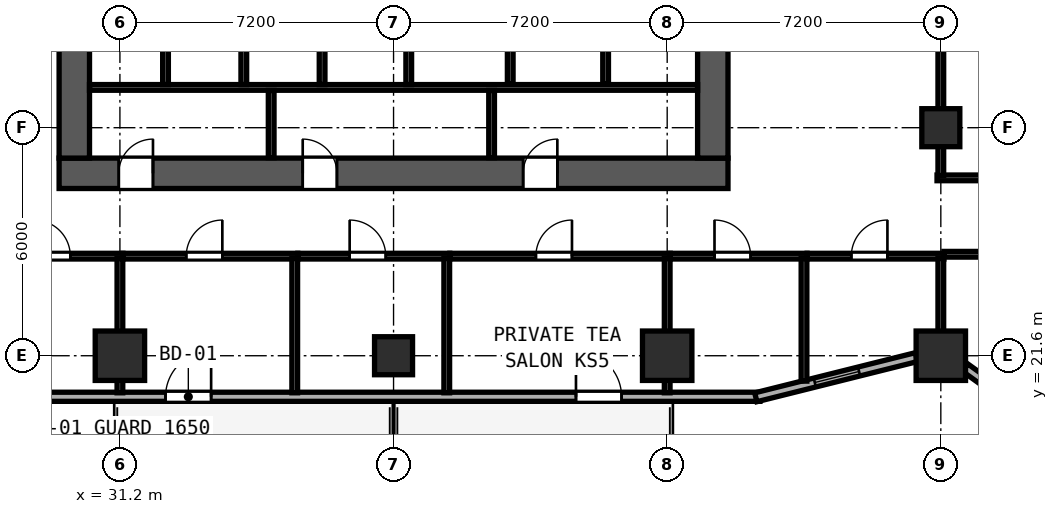
"""IFC4 building model, lengths in metres.
Left out: names, types, materials, properties, quantities, classifications, styles, units other than length and angle.
Written with IfcOpenShell. Run it as: python <this file> out.ifc"""

import sys

from ifc_helpers import new_model, si_unit, direction, frame, frame_2d, origin, origin_2d, place, context, subcontext, project, spatial, rectangle, hollow_rectangle, extrude, element, fill, save


model = new_model("IFC4")
c1 = context("Model", 3, precision=1e-05, world=origin(), true_north=direction((0.0, 1.0)))
c2 = subcontext(c1, "Body", "Model", "MODEL_VIEW")
j1 = project(units=[si_unit("LENGTHUNIT", "METRE"), si_unit("PLANEANGLEUNIT", "RADIAN")], contexts=[c1])
p1 = place(None, origin())
s1 = spatial("IfcSite", under=j1, at=p1, CompositionType="ELEMENT")
p2 = place(p1, origin())
s2 = spatial("IfcBuilding", under=s1, at=p2, CompositionType="ELEMENT")
p3 = place(p2, frame((0.0, 0.0, 39.2)))
s3 = spatial("IfcBuildingStorey", under=s2, at=p3, CompositionType="ELEMENT", Elevation=39.2)
p4 = place(p3, frame((29.6, 26.4, 0.0), z_axis=(0.0, 0.0, 1.0), x_axis=(1.0, 0.0, 0.0)))
e1 = element("IfcWall", 1, at=p4, inside=s3, PredefinedType="SHEAR", context=c2, shape_type="SweptSolid", body=[
    extrude(rectangle(XDim=17.6, YDim=0.8, at=frame_2d((8.8, 0.0))), origin(), (0.0, 0.0, 1.0), 3.54),
])
p5 = place(p4, frame((2.47, 0.0, 0.0), z_axis=(0.0, 0.0, 1.0), x_axis=(-1.0, 0.0, 0.0)))
e2 = element("IfcOpeningElement", 2, at=p5, cuts=e1, PredefinedType="OPENING", context=c2, shape_type="SweptSolid", body=[
    extrude(rectangle(XDim=0.9, YDim=2.1, at=frame_2d((0.45, 1.05))), frame((0.0, 0.41, 0.0), z_axis=(0.0, -1.0, 0.0), x_axis=(1.0, 0.0, 0.0)), (0.0, 0.0, 1.0), 0.82),
])
p6 = place(p4, frame((7.31, 0.0, 0.0), z_axis=(0.0, 0.0, 1.0), x_axis=(-1.0, 0.0, 0.0)))
e3 = element("IfcOpeningElement", 3, at=p6, cuts=e1, PredefinedType="OPENING", context=c2, shape_type="SweptSolid", body=[
    extrude(rectangle(XDim=0.9, YDim=2.1, at=frame_2d((0.45, 1.05))), frame((0.0, 0.41, 0.0), z_axis=(0.0, -1.0, 0.0), x_axis=(1.0, 0.0, 0.0)), (0.0, 0.0, 1.0), 0.82),
])
p7 = place(p4, frame((13.11, 0.0, 0.0), z_axis=(0.0, 0.0, 1.0), x_axis=(-1.0, 0.0, 0.0)))
e4 = element("IfcOpeningElement", 4, at=p7, cuts=e1, PredefinedType="OPENING", context=c2, shape_type="SweptSolid", body=[
    extrude(rectangle(XDim=0.9, YDim=2.1, at=frame_2d((0.45, 1.05))), frame((0.0, 0.41, 0.0), z_axis=(0.0, -1.0, 0.0), x_axis=(1.0, 0.0, 0.0)), (0.0, 0.0, 1.0), 0.82),
])
for number, where, z_axis, x_axis in (
    (5, (30.0, 26.8, 0.0), (0.0, 0.0, 1.0), (0.0, 1.0, 0.0)),
    (6, (46.8, 26.8, 0.0), (0.0, 0.0, 1.0), (0.0, 1.0, 0.0)),
):
    element("IfcWall", number, at=place(p3, frame(where, z_axis=z_axis, x_axis=x_axis)), inside=s3, PredefinedType="SHEAR", context=c2, shape_type="SweptSolid", body=[
        extrude(rectangle(XDim=4.05, YDim=0.8, at=frame_2d((2.025, 0.0))), origin(), (0.0, 0.0, 1.0), 3.54),
    ])
for number, where, z_axis, x_axis in (
    (7, (52.8, 21.6, 0.0), (0.0, 0.0, 1.0), (1.0, 0.0, 0.0)),
    (8, (31.2, 21.6, 0.0), (0.0, 0.0, 1.0), (1.0, 0.0, 0.0)),
    (9, (45.6, 21.6, 0.0), (0.0, 0.0, 1.0), (1.0, 0.0, 0.0)),
):
    element("IfcColumn", number, at=place(p3, frame(where, z_axis=z_axis, x_axis=x_axis)), inside=s3, PredefinedType="COLUMN", context=c2, shape_type="SweptSolid", body=[
        extrude(hollow_rectangle(XDim=1.3, YDim=1.3, WallThickness=0.048, at=origin_2d()), origin(), (0.0, 0.0, 1.0), 3.8),
    ])
for number, where, z_axis, x_axis in (
    (10, (52.8, 27.6, 0.0), (0.0, 0.0, 1.0), (1.0, 0.0, 0.0)),
    (11, (38.4, 21.6, 0.0), (0.0, 0.0, 1.0), (1.0, 0.0, 0.0)),
):
    element("IfcColumn", number, at=place(p3, frame(where, z_axis=z_axis, x_axis=x_axis)), inside=s3, PredefinedType="COLUMN", context=c2, shape_type="SweptSolid", body=[
        extrude(hollow_rectangle(XDim=1.0, YDim=1.0, WallThickness=0.038, at=origin_2d()), origin(), (0.0, 0.0, 1.0), 3.8),
    ])
p8 = place(p3, frame((28.76, 20.52, 0.0), z_axis=(0.0, 0.0, 1.0), x_axis=(1.0, 0.0, 0.0)))
e12 = element("IfcWall", 12, at=p8, inside=s3, PredefinedType="SOLIDWALL", context=c2, shape_type="SweptSolid", body=[
    extrude(rectangle(XDim=19.281, YDim=0.24, at=frame_2d((9.64, 0.0))), origin(), (0.0, 0.0, 1.0), 3.54),
])
p9 = place(p8, frame((4.84, 0.0, 0.0), z_axis=(0.0, 0.0, 1.0), x_axis=(-1.0, 0.0, 0.0)))
e13 = element("IfcOpeningElement", 13, at=p9, cuts=e12, PredefinedType="OPENING", context=c2, shape_type="SweptSolid", body=[
    extrude(rectangle(XDim=1.2, YDim=2.15, at=frame_2d((0.6, 1.075))), frame((0.0, 0.13, 0.0), z_axis=(0.0, -1.0, 0.0), x_axis=(1.0, 0.0, 0.0)), (0.0, 0.0, 1.0), 0.26),
])
p10 = place(p8, frame((15.64, 0.0, 0.0), z_axis=(0.0, 0.0, 1.0), x_axis=(-1.0, 0.0, 0.0)))
e14 = element("IfcOpeningElement", 14, at=p10, cuts=e12, PredefinedType="OPENING", context=c2, shape_type="SweptSolid", body=[
    extrude(rectangle(XDim=1.2, YDim=2.15, at=frame_2d((0.6, 1.075))), frame((0.0, 0.13, 0.0), z_axis=(0.0, -1.0, 0.0), x_axis=(1.0, 0.0, 0.0)), (0.0, 0.0, 1.0), 0.26),
])
p11 = place(p3, frame((47.932, 20.507, 0.0), z_axis=(0.0, 0.0, 1.0), x_axis=(0.970135906278, 0.242561998982, 0.0)))
e15 = element("IfcWall", 15, at=p11, inside=s3, PredefinedType="SOLIDWALL", context=c2, shape_type="SweptSolid", body=[
    extrude(rectangle(XDim=4.356, YDim=0.24, at=frame_2d((2.178, 0.0))), origin(), (0.0, 0.0, 1.0), 3.037),
])
p12 = place(p11, frame((1.6, 0.0, 0.85)))
e16 = element("IfcOpeningElement", 16, at=p12, cuts=e15, PredefinedType="OPENING", context=c2, shape_type="SweptSolid", body=[
    extrude(rectangle(XDim=1.2, YDim=1.85, at=frame_2d((0.6, 0.925))), frame((0.0, 0.13, 0.0), z_axis=(0.0, -1.0, 0.0), x_axis=(1.0, 0.0, 0.0)), (0.0, 0.0, 1.0), 0.26),
])
p13 = place(p3, frame((53.442, 21.286, 0.0), z_axis=(0.0, 0.0, 1.0), x_axis=(0.811542842993, -0.584292917967, 0.0)))
e17 = element("IfcWall", 17, at=p13, inside=s3, PredefinedType="SOLIDWALL", context=c2, shape_type="SweptSolid", body=[
    extrude(rectangle(XDim=11.438, YDim=0.24, at=frame_2d((5.719, 0.0))), origin(), (0.0, 0.0, 1.0), 3.037),
])
p14 = place(p13, frame((1.6, 0.0, 0.85)))
e18 = element("IfcOpeningElement", 18, at=p14, cuts=e17, PredefinedType="OPENING", context=c2, shape_type="SweptSolid", body=[
    extrude(rectangle(XDim=1.2, YDim=1.85, at=frame_2d((0.6, 0.925))), frame((0.0, 0.13, 0.0), z_axis=(0.0, -1.0, 0.0), x_axis=(1.0, 0.0, 0.0)), (0.0, 0.0, 1.0), 0.26),
])
p15 = place(p13, frame((7.0, 0.0, 0.85)))
e19 = element("IfcOpeningElement", 19, at=p15, cuts=e17, PredefinedType="OPENING", context=c2, shape_type="SweptSolid", body=[
    extrude(rectangle(XDim=1.2, YDim=1.85, at=frame_2d((0.6, 0.925))), frame((0.0, 0.13, 0.0), z_axis=(0.0, -1.0, 0.0), x_axis=(1.0, 0.0, 0.0)), (0.0, 0.0, 1.0), 0.26),
])
p16 = place(p13, frame((9.669, 0.0, 0.85)))
e20 = element("IfcOpeningElement", 20, at=p16, cuts=e17, PredefinedType="OPENING", context=c2, shape_type="SweptSolid", body=[
    extrude(rectangle(XDim=1.2, YDim=1.85, at=frame_2d((0.6, 0.925))), frame((0.0, 0.13, 0.0), z_axis=(0.0, -1.0, 0.0), x_axis=(1.0, 0.0, 0.0)), (0.0, 0.0, 1.0), 0.26),
])
p17 = place(p3, frame((30.4, 28.66, 0.0), z_axis=(0.0, 0.0, 1.0), x_axis=(1.0, 0.0, 0.0)))
e21 = element("IfcWall", 21, at=p17, inside=s3, PredefinedType="PARTITIONING", context=c2, shape_type="SweptSolid", body=[
    extrude(rectangle(XDim=16.0, YDim=0.15, at=frame_2d((8.0, 0.0))), origin(), (0.0, 0.0, 1.0), 3.54),
])
for number, where, z_axis, x_axis in (
    (22, (32.4, 28.735, 0.0), (0.0, 0.0, 1.0), (0.0, 1.0, 0.0)),
    (23, (34.46, 28.735, 0.0), (0.0, 0.0, 1.0), (0.0, 1.0, 0.0)),
    (24, (36.52, 28.735, 0.0), (0.0, 0.0, 1.0), (0.0, 1.0, 0.0)),
    (25, (38.8, 28.735, 0.0), (0.0, 0.0, 1.0), (0.0, 1.0, 0.0)),
):
    element("IfcWall", number, at=place(p3, frame(where, z_axis=z_axis, x_axis=x_axis)), inside=s3, PredefinedType="SOLIDWALL", context=c2, shape_type="SweptSolid", body=[
        extrude(rectangle(XDim=1.985, YDim=0.15, at=frame_2d((0.992, 0.0))), origin(), (0.0, 0.0, 1.0), 3.54),
    ])
for number, where, z_axis, x_axis in (
    (26, (35.18, 26.81, 0.0), (0.0, 0.0, 1.0), (0.0, 1.0, 0.0)),
    (27, (40.98, 26.81, 0.0), (0.0, 0.0, 1.0), (0.0, 1.0, 0.0)),
):
    element("IfcWall", number, at=place(p3, frame(where, z_axis=z_axis, x_axis=x_axis)), inside=s3, PredefinedType="PARTITIONING", context=c2, shape_type="SweptSolid", body=[
        extrude(rectangle(XDim=1.77, YDim=0.15, at=frame_2d((0.885, 0.0))), origin(), (0.0, 0.0, 1.0), 3.54),
    ])
for number, where, z_axis, x_axis in (
    (28, (41.47, 28.75, 0.0), (0.0, 0.0, 1.0), (0.0, 1.0, 0.0)),
    (29, (43.98, 28.75, 0.0), (0.0, 0.0, 1.0), (0.0, 1.0, 0.0)),
):
    element("IfcWall", number, at=place(p3, frame(where, z_axis=z_axis, x_axis=x_axis)), inside=s3, PredefinedType="SOLIDWALL", context=c2, shape_type="SweptSolid", body=[
        extrude(rectangle(XDim=1.985, YDim=0.15, at=frame_2d((0.993, 0.0))), origin(), (0.0, 0.0, 1.0), 3.54),
    ])
p18 = place(p3, frame((27.882, 24.22, 0.0), z_axis=(0.0, 0.0, 1.0), x_axis=(1.0, 0.0, 0.0)))
e30 = element("IfcWall", 30, at=p18, inside=s3, PredefinedType="PARTITIONING", context=c2, shape_type="SweptSolid", body=[
    extrude(rectangle(XDim=3.398, YDim=0.15, at=frame_2d((1.699, 0.0))), origin(), (0.0, 0.0, 1.0), 3.54),
])
p19 = place(p18, frame((2.013, 0.0, 0.0), z_axis=(0.0, 0.0, 1.0), x_axis=(-1.0, 0.0, 0.0)))
e31 = element("IfcOpeningElement", 31, at=p19, cuts=e30, PredefinedType="OPENING", context=c2, shape_type="SweptSolid", body=[
    extrude(rectangle(XDim=0.95, YDim=2.12, at=frame_2d((0.475, 1.06))), frame((0.0, 0.085, 0.0), z_axis=(0.0, -1.0, 0.0), x_axis=(1.0, 0.0, 0.0)), (0.0, 0.0, 1.0), 0.17),
])
p20 = place(p3, frame((31.2, 20.625, 0.0), z_axis=(0.0, 0.0, 1.0), x_axis=(0.0, 1.0, 0.0)))
e32 = element("IfcWall", 32, at=p20, inside=s3, PredefinedType="PARTITIONING", context=c2, shape_type="SweptSolid", body=[
    extrude(rectangle(XDim=3.535, YDim=0.15, at=frame_2d((1.768, 0.0))), origin(), (0.0, 0.0, 1.0), 2.925),
])
p21 = place(p3, frame((31.282, 24.22, 0.0), z_axis=(0.0, 0.0, 1.0), x_axis=(1.0, 0.0, 0.0)))
e33 = element("IfcWall", 33, at=p21, inside=s3, PredefinedType="PARTITIONING", context=c2, shape_type="SweptSolid", body=[
    extrude(rectangle(XDim=4.598, YDim=0.15, at=frame_2d((2.299, 0.0))), origin(), (0.0, 0.0, 1.0), 3.54),
])
p22 = place(p21, frame((2.613, 0.0, 0.0), z_axis=(0.0, 0.0, 1.0), x_axis=(-1.0, 0.0, 0.0)))
e34 = element("IfcOpeningElement", 34, at=p22, cuts=e33, PredefinedType="OPENING", context=c2, shape_type="SweptSolid", body=[
    extrude(rectangle(XDim=0.95, YDim=2.12, at=frame_2d((0.475, 1.06))), frame((0.0, 0.085, 0.0), z_axis=(0.0, -1.0, 0.0), x_axis=(1.0, 0.0, 0.0)), (0.0, 0.0, 1.0), 0.17),
])
p23 = place(p3, frame((35.8, 20.625, 0.0), z_axis=(0.0, 0.0, 1.0), x_axis=(0.0, 1.0, 0.0)))
e35 = element("IfcWall", 35, at=p23, inside=s3, PredefinedType="PARTITIONING", context=c2, shape_type="SweptSolid", body=[
    extrude(rectangle(XDim=3.535, YDim=0.15, at=frame_2d((1.768, 0.0))), origin(), (0.0, 0.0, 1.0), 3.54),
])
p24 = place(p3, frame((35.882, 24.22, 0.0), z_axis=(0.0, 0.0, 1.0), x_axis=(1.0, 0.0, 0.0)))
e36 = element("IfcWall", 36, at=p24, inside=s3, PredefinedType="PARTITIONING", context=c2, shape_type="SweptSolid", body=[
    extrude(rectangle(XDim=3.998, YDim=0.15, at=frame_2d((1.999, 0.0))), origin(), (0.0, 0.0, 1.0), 3.54),
])
p25 = place(p24, frame((2.313, 0.0, 0.0), z_axis=(0.0, 0.0, 1.0), x_axis=(-1.0, 0.0, 0.0)))
e37 = element("IfcOpeningElement", 37, at=p25, cuts=e36, PredefinedType="OPENING", context=c2, shape_type="SweptSolid", body=[
    extrude(rectangle(XDim=0.95, YDim=2.12, at=frame_2d((0.475, 1.06))), frame((0.0, 0.085, 0.0), z_axis=(0.0, -1.0, 0.0), x_axis=(1.0, 0.0, 0.0)), (0.0, 0.0, 1.0), 0.17),
])
p26 = place(p3, frame((39.8, 20.625, 0.0), z_axis=(0.0, 0.0, 1.0), x_axis=(0.0, 1.0, 0.0)))
e38 = element("IfcWall", 38, at=p26, inside=s3, PredefinedType="PARTITIONING", context=c2, shape_type="SweptSolid", body=[
    extrude(rectangle(XDim=3.535, YDim=0.15, at=frame_2d((1.768, 0.0))), origin(), (0.0, 0.0, 1.0), 3.54),
])
p27 = place(p3, frame((39.882, 24.22, 0.0), z_axis=(0.0, 0.0, 1.0), x_axis=(1.0, 0.0, 0.0)))
e39 = element("IfcWall", 39, at=p27, inside=s3, PredefinedType="PARTITIONING", context=c2, shape_type="SweptSolid", body=[
    extrude(rectangle(XDim=5.798, YDim=0.15, at=frame_2d((2.899, 0.0))), origin(), (0.0, 0.0, 1.0), 3.54),
])
p28 = place(p27, frame((3.213, 0.0, 0.0), z_axis=(0.0, 0.0, 1.0), x_axis=(-1.0, 0.0, 0.0)))
e40 = element("IfcOpeningElement", 40, at=p28, cuts=e39, PredefinedType="OPENING", context=c2, shape_type="SweptSolid", body=[
    extrude(rectangle(XDim=0.95, YDim=2.12, at=frame_2d((0.475, 1.06))), frame((0.0, 0.085, 0.0), z_axis=(0.0, -1.0, 0.0), x_axis=(1.0, 0.0, 0.0)), (0.0, 0.0, 1.0), 0.17),
])
p29 = place(p3, frame((45.6, 20.625, 0.0), z_axis=(0.0, 0.0, 1.0), x_axis=(0.0, 1.0, 0.0)))
e41 = element("IfcWall", 41, at=p29, inside=s3, PredefinedType="PARTITIONING", context=c2, shape_type="SweptSolid", body=[
    extrude(rectangle(XDim=3.535, YDim=0.15, at=frame_2d((1.768, 0.0))), origin(), (0.0, 0.0, 1.0), 2.925),
])
p30 = place(p3, frame((45.682, 24.22, 0.0), z_axis=(0.0, 0.0, 1.0), x_axis=(1.0, 0.0, 0.0)))
e42 = element("IfcWall", 42, at=p30, inside=s3, PredefinedType="PARTITIONING", context=c2, shape_type="SweptSolid", body=[
    extrude(rectangle(XDim=3.598, YDim=0.15, at=frame_2d((1.799, 0.0))), origin(), (0.0, 0.0, 1.0), 3.54),
])
p31 = place(p30, frame((2.113, 0.0, 0.0), z_axis=(0.0, 0.0, 1.0), x_axis=(-1.0, 0.0, 0.0)))
e43 = element("IfcOpeningElement", 43, at=p31, cuts=e42, PredefinedType="OPENING", context=c2, shape_type="SweptSolid", body=[
    extrude(rectangle(XDim=0.95, YDim=2.12, at=frame_2d((0.475, 1.06))), frame((0.0, 0.085, 0.0), z_axis=(0.0, -1.0, 0.0), x_axis=(1.0, 0.0, 0.0)), (0.0, 0.0, 1.0), 0.17),
])
p32 = place(p3, frame((49.2, 20.932, 0.0), z_axis=(0.0, 0.0, 1.0), x_axis=(0.0, 1.0, 0.0)))
e44 = element("IfcWall", 44, at=p32, inside=s3, PredefinedType="PARTITIONING", context=c2, shape_type="SweptSolid", body=[
    extrude(rectangle(XDim=3.228, YDim=0.15, at=frame_2d((1.614, 0.0))), origin(), (0.0, 0.0, 1.0), 3.54),
])
p33 = place(p3, frame((49.282, 24.22, 0.0), z_axis=(0.0, 0.0, 1.0), x_axis=(1.0, 0.0, 0.0)))
e45 = element("IfcWall", 45, at=p33, inside=s3, PredefinedType="PARTITIONING", context=c2, shape_type="SweptSolid", body=[
    extrude(rectangle(XDim=3.598, YDim=0.15, at=frame_2d((1.799, 0.0))), origin(), (0.0, 0.0, 1.0), 3.54),
])
p34 = place(p33, frame((2.113, 0.0, 0.0), z_axis=(0.0, 0.0, 1.0), x_axis=(-1.0, 0.0, 0.0)))
e46 = element("IfcOpeningElement", 46, at=p34, cuts=e45, PredefinedType="OPENING", context=c2, shape_type="SweptSolid", body=[
    extrude(rectangle(XDim=0.95, YDim=2.12, at=frame_2d((0.475, 1.06))), frame((0.0, 0.085, 0.0), z_axis=(0.0, -1.0, 0.0), x_axis=(1.0, 0.0, 0.0)), (0.0, 0.0, 1.0), 0.17),
])
p35 = place(p3, frame((52.8, 21.819, 0.0), z_axis=(0.0, 0.0, 1.0), x_axis=(0.0, 1.0, 0.0)))
e47 = element("IfcWall", 47, at=p35, inside=s3, PredefinedType="PARTITIONING", context=c2, shape_type="SweptSolid", body=[
    extrude(rectangle(XDim=2.341, YDim=0.15, at=frame_2d((1.171, 0.0))), origin(), (0.0, 0.0, 1.0), 3.037),
])
p36 = place(p3, frame((52.7, 26.28, 0.0), z_axis=(0.0, 0.0, 1.0), x_axis=(1.0, 0.0, 0.0)))
e48 = element("IfcWall", 48, at=p36, inside=s3, PredefinedType="PARTITIONING", context=c2, shape_type="SweptSolid", body=[
    extrude(rectangle(XDim=4.23, YDim=0.15, at=frame_2d((2.115, 0.0))), origin(), (0.0, 0.0, 1.0), 3.54),
])
p37 = place(p36, frame((3.014, 0.0, 0.0)))
e49 = element("IfcOpeningElement", 49, at=p37, cuts=e48, PredefinedType="OPENING", context=c2, shape_type="SweptSolid", body=[
    extrude(rectangle(XDim=0.95, YDim=2.18, at=frame_2d((0.475, 1.09))), frame((0.0, 0.085, 0.0), z_axis=(0.0, -1.0, 0.0), x_axis=(1.0, 0.0, 0.0)), (0.0, 0.0, 1.0), 0.17),
])
p38 = place(p3, frame((52.8, 26.34, 0.0), z_axis=(0.0, 0.0, 1.0), x_axis=(0.0, 1.0, 0.0)))
e50 = element("IfcWall", 50, at=p38, inside=s3, PredefinedType="PARTITIONING", context=c2, shape_type="SweptSolid", body=[
    extrude(rectangle(XDim=6.6, YDim=0.15, at=frame_2d((3.3, 0.0))), origin(), (0.0, 0.0, 1.0), 3.037),
])
p39 = place(p3, frame((52.882, 24.27, 0.0), z_axis=(0.0, 0.0, 1.0), x_axis=(1.0, 0.0, 0.0)))
e51 = element("IfcWall", 51, at=p39, inside=s3, PredefinedType="PARTITIONING", context=c2, shape_type="SweptSolid", body=[
    extrude(rectangle(XDim=4.028, YDim=0.15, at=frame_2d((2.014, 0.0))), origin(), (0.0, 0.0, 1.0), 3.54),
])
p40 = place(p39, frame((2.328, 0.0, 0.0), z_axis=(0.0, 0.0, 1.0), x_axis=(-1.0, 0.0, 0.0)))
e52 = element("IfcOpeningElement", 52, at=p40, cuts=e51, PredefinedType="OPENING", context=c2, shape_type="SweptSolid", body=[
    extrude(rectangle(XDim=0.95, YDim=2.12, at=frame_2d((0.475, 1.06))), frame((0.0, 0.085, 0.0), z_axis=(0.0, -1.0, 0.0), x_axis=(1.0, 0.0, 0.0)), (0.0, 0.0, 1.0), 0.17),
])
p41 = place(p12, origin())
e53 = element("IfcWindow", 53, at=p41, inside=s3, PartitioningType="SINGLE_PANEL", PredefinedType="WINDOW", context=c2, shape_type="SweptSolid", body=[
    extrude(rectangle(XDim=1.2, YDim=1.85, at=frame_2d((0.6, 0.925))), frame((0.0, 0.03, 0.0), z_axis=(0.0, -1.0, 0.0), x_axis=(1.0, 0.0, 0.0)), (0.0, 0.0, 1.0), 0.06),
])
fill(e16, e53)
p42 = place(p9, origin())
e54 = element("IfcDoor", 54, at=p42, inside=s3, OperationType="SINGLE_SWING_LEFT", PredefinedType="DOOR", context=c2, shape_type="SweptSolid", body=[
    extrude(rectangle(XDim=1.2, YDim=2.15, at=frame_2d((0.6, 1.075))), frame((0.0, 0.025, 0.0), z_axis=(0.0, -1.0, 0.0), x_axis=(1.0, 0.0, 0.0)), (0.0, 0.0, 1.0), 0.05),
])
fill(e13, e54)
p43 = place(p10, origin())
e55 = element("IfcDoor", 55, at=p43, inside=s3, OperationType="SINGLE_SWING_RIGHT", PredefinedType="DOOR", context=c2, shape_type="SweptSolid", body=[
    extrude(rectangle(XDim=1.2, YDim=2.15, at=frame_2d((0.6, 1.075))), frame((0.0, 0.025, 0.0), z_axis=(0.0, -1.0, 0.0), x_axis=(1.0, 0.0, 0.0)), (0.0, 0.0, 1.0), 0.05),
])
fill(e14, e55)
p44 = place(p5, origin())
e56 = element("IfcDoor", 56, at=p44, inside=s3, OperationType="SINGLE_SWING_LEFT", PredefinedType="DOOR", context=c2, shape_type="SweptSolid", body=[
    extrude(rectangle(XDim=0.9, YDim=2.1, at=frame_2d((0.45, 1.05))), frame((0.0, -0.195, 0.0), z_axis=(0.0, -1.0, 0.0), x_axis=(1.0, 0.0, 0.0)), (0.0, 0.0, 1.0), 0.05),
])
fill(e2, e56)
p45 = place(p6, origin())
e57 = element("IfcDoor", 57, at=p45, inside=s3, OperationType="SINGLE_SWING_RIGHT", PredefinedType="DOOR", context=c2, shape_type="SweptSolid", body=[
    extrude(rectangle(XDim=0.9, YDim=2.1, at=frame_2d((0.45, 1.05))), frame((0.0, -0.195, 0.0), z_axis=(0.0, -1.0, 0.0), x_axis=(1.0, 0.0, 0.0)), (0.0, 0.0, 1.0), 0.05),
])
fill(e3, e57)
p46 = place(p7, origin())
e58 = element("IfcDoor", 58, at=p46, inside=s3, OperationType="SINGLE_SWING_LEFT", PredefinedType="DOOR", context=c2, shape_type="SweptSolid", body=[
    extrude(rectangle(XDim=0.9, YDim=2.1, at=frame_2d((0.45, 1.05))), frame((0.0, -0.195, 0.0), z_axis=(0.0, -1.0, 0.0), x_axis=(1.0, 0.0, 0.0)), (0.0, 0.0, 1.0), 0.05),
])
fill(e4, e58)
p47 = place(p19, origin())
e59 = element("IfcDoor", 59, at=p47, inside=s3, OperationType="SINGLE_SWING_RIGHT", PredefinedType="DOOR", context=c2, shape_type="SweptSolid", body=[
    extrude(rectangle(XDim=0.95, YDim=2.12, at=frame_2d((0.475, 1.06))), frame((0.0, 0.025, 0.0), z_axis=(0.0, -1.0, 0.0), x_axis=(1.0, 0.0, 0.0)), (0.0, 0.0, 1.0), 0.05),
])
fill(e31, e59)
p48 = place(p22, origin())
e60 = element("IfcDoor", 60, at=p48, inside=s3, OperationType="SINGLE_SWING_LEFT", PredefinedType="DOOR", context=c2, shape_type="SweptSolid", body=[
    extrude(rectangle(XDim=0.95, YDim=2.12, at=frame_2d((0.475, 1.06))), frame((0.0, 0.025, 0.0), z_axis=(0.0, -1.0, 0.0), x_axis=(1.0, 0.0, 0.0)), (0.0, 0.0, 1.0), 0.05),
])
fill(e34, e60)
p49 = place(p25, origin())
e61 = element("IfcDoor", 61, at=p49, inside=s3, OperationType="SINGLE_SWING_RIGHT", PredefinedType="DOOR", context=c2, shape_type="SweptSolid", body=[
    extrude(rectangle(XDim=0.95, YDim=2.12, at=frame_2d((0.475, 1.06))), frame((0.0, 0.025, 0.0), z_axis=(0.0, -1.0, 0.0), x_axis=(1.0, 0.0, 0.0)), (0.0, 0.0, 1.0), 0.05),
])
fill(e37, e61)
p50 = place(p28, origin())
e62 = element("IfcDoor", 62, at=p50, inside=s3, OperationType="SINGLE_SWING_LEFT", PredefinedType="DOOR", context=c2, shape_type="SweptSolid", body=[
    extrude(rectangle(XDim=0.95, YDim=2.12, at=frame_2d((0.475, 1.06))), frame((0.0, 0.025, 0.0), z_axis=(0.0, -1.0, 0.0), x_axis=(1.0, 0.0, 0.0)), (0.0, 0.0, 1.0), 0.05),
])
fill(e40, e62)
p51 = place(p31, origin())
e63 = element("IfcDoor", 63, at=p51, inside=s3, OperationType="SINGLE_SWING_RIGHT", PredefinedType="DOOR", context=c2, shape_type="SweptSolid", body=[
    extrude(rectangle(XDim=0.95, YDim=2.12, at=frame_2d((0.475, 1.06))), frame((0.0, 0.025, 0.0), z_axis=(0.0, -1.0, 0.0), x_axis=(1.0, 0.0, 0.0)), (0.0, 0.0, 1.0), 0.05),
])
fill(e43, e63)
p52 = place(p34, origin())
e64 = element("IfcDoor", 64, at=p52, inside=s3, OperationType="SINGLE_SWING_LEFT", PredefinedType="DOOR", context=c2, shape_type="SweptSolid", body=[
    extrude(rectangle(XDim=0.95, YDim=2.12, at=frame_2d((0.475, 1.06))), frame((0.0, 0.025, 0.0), z_axis=(0.0, -1.0, 0.0), x_axis=(1.0, 0.0, 0.0)), (0.0, 0.0, 1.0), 0.05),
])
fill(e46, e64)
save(model, sys.argv[1])
